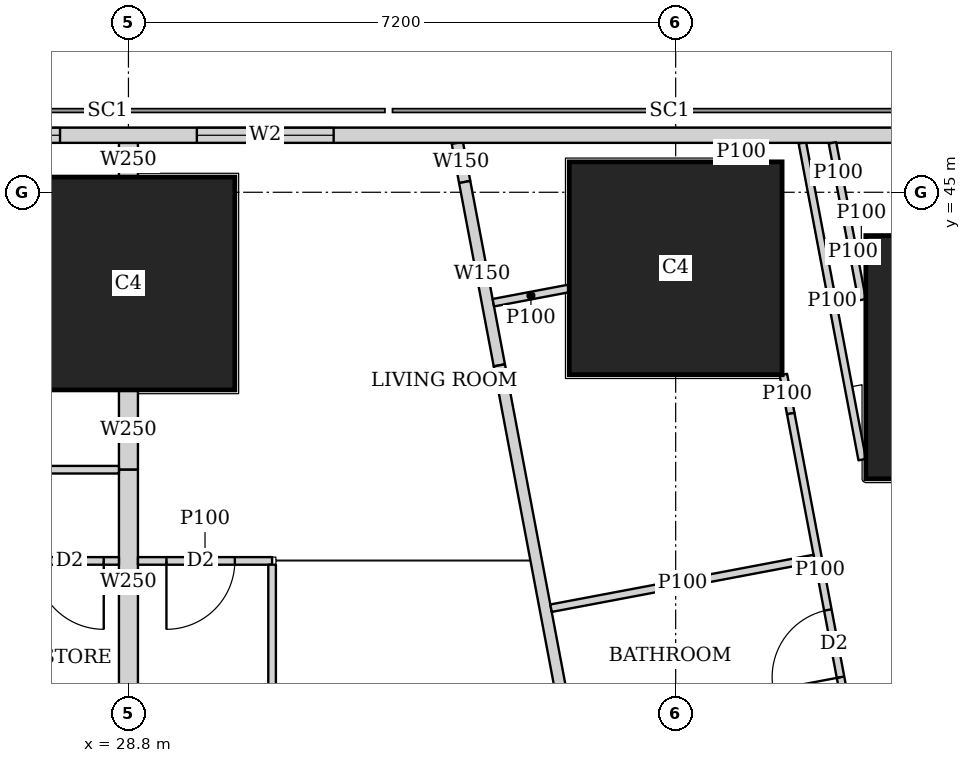
"""IFC4 building model, lengths in metres.
Left out: names, types, materials, properties, quantities, classifications, styles, units other than length and angle.
Written with IfcOpenShell. Run it as: python <this file> out.ifc"""

import sys

from ifc_helpers import new_model, si_unit, direction, frame, frame_2d, origin, origin_2d, place, context, subcontext, project, spatial, rectangle, extrude, element, fill, save


model = new_model("IFC4")
c1 = context("Model", 3, precision=1e-05, world=origin(), true_north=direction((0.0, 1.0)))
c2 = subcontext(c1, "Body", "Model", "MODEL_VIEW")
j1 = project(units=[si_unit("LENGTHUNIT", "METRE"), si_unit("PLANEANGLEUNIT", "RADIAN")], contexts=[c1])
p1 = place(None, origin())
s1 = spatial("IfcSite", under=j1, at=p1, CompositionType="ELEMENT")
p2 = place(p1, origin())
s2 = spatial("IfcBuilding", under=s1, at=p2, CompositionType="ELEMENT")
p3 = place(p2, frame((0.0, 0.0, 42.5)))
s3 = spatial("IfcBuildingStorey", under=s2, at=p3, CompositionType="ELEMENT", Elevation=42.5)
p4 = place(p3, frame((40.102, 42.83, 0.0), z_axis=(0.0, 0.0, 1.0), x_axis=(1.0, 0.0, 0.0)))
e1 = element("IfcColumn", 1, at=p4, inside=s3, PredefinedType="COLUMN", context=c2, shape_type="SweptSolid", body=[
    extrude(rectangle(XDim=3.2, YDim=3.2, at=origin_2d()), origin(), (0.0, 0.0, 1.0), 3.75),
])
for number, where, z_axis, x_axis in (
    (2, (28.8, 43.8, 0.0), (0.0, 0.0, 1.0), (1.0, 0.0, 0.0)),
    (3, (36.0, 44.0, 0.0), (0.0, 0.0, 1.0), (1.0, 0.0, 0.0)),
):
    element("IfcColumn", number, at=place(p3, frame(where, z_axis=z_axis, x_axis=x_axis)), inside=s3, PredefinedType="COLUMN", context=c2, shape_type="SweptSolid", body=[
        extrude(rectangle(XDim=2.8, YDim=2.8, at=origin_2d()), origin(), (0.0, 0.0, 1.0), 3.75),
    ])
p5 = place(p3, frame((40.106, 45.75, 0.0), z_axis=(0.0, 0.0, 1.0), x_axis=(-1.0, 0.0, 0.0)))
e4 = element("IfcWall", 4, at=p5, inside=s3, PredefinedType="SOLIDWALL", context=c2, shape_type="SweptSolid", body=[
    extrude(rectangle(XDim=37.943, YDim=0.2, at=frame_2d((18.971, 0.0))), origin(), (0.0, 0.0, 1.0), 3.5),
])
p6 = place(p5, frame((8.606, 0.0, 0.9)))
e5 = element("IfcOpeningElement", 5, at=p6, cuts=e4, PredefinedType="OPENING", context=c2, shape_type="SweptSolid", body=[
    extrude(rectangle(XDim=1.8, YDim=1.5, at=frame_2d((0.9, 0.75))), frame((0.0, 0.11, 0.0), z_axis=(0.0, -1.0, 0.0), x_axis=(1.0, 0.0, 0.0)), (0.0, 0.0, 1.0), 0.22),
])
p7 = place(p5, frame((12.206, 0.0, 0.9)))
e6 = element("IfcOpeningElement", 6, at=p7, cuts=e4, PredefinedType="OPENING", context=c2, shape_type="SweptSolid", body=[
    extrude(rectangle(XDim=1.8, YDim=1.5, at=frame_2d((0.9, 0.75))), frame((0.0, 0.11, 0.0), z_axis=(0.0, -1.0, 0.0), x_axis=(1.0, 0.0, 0.0)), (0.0, 0.0, 1.0), 0.22),
])
p8 = place(p5, frame((15.806, 0.0, 0.9)))
e7 = element("IfcOpeningElement", 7, at=p8, cuts=e4, PredefinedType="OPENING", context=c2, shape_type="SweptSolid", body=[
    extrude(rectangle(XDim=1.8, YDim=1.5, at=frame_2d((0.9, 0.75))), frame((0.0, 0.11, 0.0), z_axis=(0.0, -1.0, 0.0), x_axis=(1.0, 0.0, 0.0)), (0.0, 0.0, 1.0), 0.22),
])
p9 = place(p5, frame((19.406, 0.0, 0.9)))
e8 = element("IfcOpeningElement", 8, at=p9, cuts=e4, PredefinedType="OPENING", context=c2, shape_type="SweptSolid", body=[
    extrude(rectangle(XDim=1.8, YDim=1.5, at=frame_2d((0.9, 0.75))), frame((0.0, 0.11, 0.0), z_axis=(0.0, -1.0, 0.0), x_axis=(1.0, 0.0, 0.0)), (0.0, 0.0, 1.0), 0.22),
])
p10 = place(p5, frame((23.006, 0.0, 0.9)))
e9 = element("IfcOpeningElement", 9, at=p10, cuts=e4, PredefinedType="OPENING", context=c2, shape_type="SweptSolid", body=[
    extrude(rectangle(XDim=1.8, YDim=1.5, at=frame_2d((0.9, 0.75))), frame((0.0, 0.11, 0.0), z_axis=(0.0, -1.0, 0.0), x_axis=(1.0, 0.0, 0.0)), (0.0, 0.0, 1.0), 0.22),
])
p11 = place(p5, frame((26.606, 0.0, 0.9)))
e10 = element("IfcOpeningElement", 10, at=p11, cuts=e4, PredefinedType="OPENING", context=c2, shape_type="SweptSolid", body=[
    extrude(rectangle(XDim=1.8, YDim=1.5, at=frame_2d((0.9, 0.75))), frame((0.0, 0.11, 0.0), z_axis=(0.0, -1.0, 0.0), x_axis=(1.0, 0.0, 0.0)), (0.0, 0.0, 1.0), 0.22),
])
p12 = place(p3, frame((33.127, 45.65, 0.0), z_axis=(0.0, 0.0, 1.0), x_axis=(0.185441815104, -0.982655246366, 0.0)))
e11 = element("IfcWall", 11, at=p12, inside=s3, PredefinedType="SOLIDWALL", context=c2, shape_type="SweptSolid", body=[
    extrude(rectangle(XDim=0.524, YDim=0.15, at=frame_2d((0.262, 0.0))), origin(), (0.0, 0.0, 1.0), 3.5),
])
p13 = place(p3, frame((33.224, 45.135, 0.0), z_axis=(0.0, 0.0, 1.0), x_axis=(0.185681462868, -0.982609990967, 0.0)))
e12 = element("IfcWall", 12, at=p13, inside=s3, PredefinedType="SOLIDWALL", context=c2, shape_type="SweptSolid", body=[
    extrude(rectangle(XDim=2.455, YDim=0.15, at=frame_2d((1.228, 0.0))), origin(), (0.0, 0.0, 1.0), 2.05),
])
p14 = place(p3, frame((33.68, 42.723, 0.0), z_axis=(0.0, 0.0, 1.0), x_axis=(0.185624129307, -0.98262082342, 0.0)))
e13 = element("IfcWall", 13, at=p14, inside=s3, PredefinedType="SOLIDWALL", context=c2, shape_type="SweptSolid", body=[
    extrude(rectangle(XDim=41.051, YDim=0.15, at=frame_2d((20.526, 0.0))), origin(), (0.0, 0.0, 1.0), 2.5),
])
p15 = place(p14, frame((7.73, 0.0, 0.0)))
e14 = element("IfcOpeningElement", 14, at=p15, cuts=e13, PredefinedType="OPENING", context=c2, shape_type="SweptSolid", body=[
    extrude(rectangle(XDim=1.0, YDim=2.1, at=frame_2d((0.5, 1.05))), frame((0.0, 0.085, 0.0), z_axis=(0.0, -1.0, 0.0), x_axis=(1.0, 0.0, 0.0)), (0.0, 0.0, 1.0), 0.17),
])
p16 = place(p14, frame((12.307, 0.0, 0.0)))
e15 = element("IfcOpeningElement", 15, at=p16, cuts=e13, PredefinedType="OPENING", context=c2, shape_type="SweptSolid", body=[
    extrude(rectangle(XDim=1.0, YDim=2.1, at=frame_2d((0.5, 1.05))), frame((0.0, 0.085, 0.0), z_axis=(0.0, -1.0, 0.0), x_axis=(1.0, 0.0, 0.0)), (0.0, 0.0, 1.0), 0.17),
])
p17 = place(p14, frame((19.938, 0.0, 0.0)))
e16 = element("IfcOpeningElement", 16, at=p17, cuts=e13, PredefinedType="OPENING", context=c2, shape_type="SweptSolid", body=[
    extrude(rectangle(XDim=1.0, YDim=2.1, at=frame_2d((0.5, 1.05))), frame((0.0, 0.085, 0.0), z_axis=(0.0, -1.0, 0.0), x_axis=(1.0, 0.0, 0.0)), (0.0, 0.0, 1.0), 0.17),
])
p18 = place(p14, frame((32.193, 0.0, 0.0)))
e17 = element("IfcOpeningElement", 17, at=p18, cuts=e13, PredefinedType="OPENING", context=c2, shape_type="SweptSolid", body=[
    extrude(rectangle(XDim=1.0, YDim=2.1, at=frame_2d((0.5, 1.05))), frame((0.0, 0.085, 0.0), z_axis=(0.0, -1.0, 0.0), x_axis=(1.0, 0.0, 0.0)), (0.0, 0.0, 1.0), 0.17),
])
p19 = place(p3, frame((38.454, 41.483, 0.0), z_axis=(0.0, 0.0, 1.0), x_axis=(-0.185609245326, 0.982623634994, 0.0)))
e18 = element("IfcWall", 18, at=p19, inside=s3, PredefinedType="PARTITIONING", context=c2, shape_type="SweptSolid", body=[
    extrude(rectangle(XDim=4.241, YDim=0.1, at=frame_2d((2.12, 0.0))), origin(), (0.0, 0.0, 1.0), 2.05),
])
p20 = place(p3, frame((38.063, 45.65, 0.0), z_axis=(0.0, 0.0, 1.0), x_axis=(0.186109918919, -0.982528929895, 0.0)))
e19 = element("IfcWall", 19, at=p20, inside=s3, PredefinedType="PARTITIONING", context=c2, shape_type="SweptSolid", body=[
    extrude(rectangle(XDim=0.817, YDim=0.1, at=frame_2d((0.409, 0.0))), origin(), (0.0, 0.0, 1.0), 3.5),
])
p21 = place(p3, frame((38.215, 44.847, 0.0), z_axis=(0.0, 0.0, 1.0), x_axis=(0.185310800156, -0.982679961811, 0.0)))
e20 = element("IfcWall", 20, at=p21, inside=s3, PredefinedType="PARTITIONING", context=c2, shape_type="SweptSolid", body=[
    extrude(rectangle(XDim=1.283, YDim=0.1, at=frame_2d((0.642, 0.0))), origin(), (0.0, 0.0, 1.0), 2.05),
])
p22 = place(p3, frame((36.841, 45.65, 0.0), z_axis=(0.0, 0.0, 1.0), x_axis=(0.183986661451, -0.982928740249, 0.0)))
e21 = element("IfcWall", 21, at=p22, inside=s3, PredefinedType="PARTITIONING", context=c2, shape_type="SweptSolid", body=[
    extrude(rectangle(XDim=0.244, YDim=0.1, at=frame_2d((0.122, 0.0))), origin(), (0.0, 0.0, 1.0), 3.5),
])
p23 = place(p3, frame((37.417, 42.602, 0.0), z_axis=(0.0, 0.0, 1.0), x_axis=(0.185672001976, -0.982611778721, 0.0)))
e22 = element("IfcWall", 22, at=p23, inside=s3, PredefinedType="PARTITIONING", context=c2, shape_type="SweptSolid", body=[
    extrude(rectangle(XDim=0.522, YDim=0.1, at=frame_2d((0.261, 0.0))), origin(), (0.0, 0.0, 1.0), 2.05),
])
p24 = place(p3, frame((37.514, 42.089, 0.0), z_axis=(0.0, 0.0, 1.0), x_axis=(0.185540945282, -0.982636533833, 0.0)))
e23 = element("IfcWall", 23, at=p24, inside=s3, PredefinedType="PARTITIONING", context=c2, shape_type="SweptSolid", body=[
    extrude(rectangle(XDim=4.178, YDim=0.1, at=frame_2d((2.089, 0.0))), origin(), (0.0, 0.0, 1.0), 3.5),
])
p25 = place(p24, frame((2.63, 0.0, 0.0)))
e24 = element("IfcOpeningElement", 24, at=p25, cuts=e23, PredefinedType="OPENING", context=c2, shape_type="SweptSolid", body=[
    extrude(rectangle(XDim=0.9, YDim=2.1, at=frame_2d((0.45, 1.05))), frame((0.0, 0.06, 0.0), z_axis=(0.0, -1.0, 0.0), x_axis=(1.0, 0.0, 0.0)), (0.0, 0.0, 1.0), 0.12),
])
p26 = place(p3, frame((38.492, 44.193, 0.0), z_axis=(0.0, 0.0, 1.0), x_axis=(-0.981954528773, -0.189117168504, 0.0)))
e25 = element("IfcWall", 25, at=p26, inside=s3, PredefinedType="PARTITIONING", context=c2, shape_type="SweptSolid", body=[
    extrude(rectangle(XDim=0.101, YDim=0.1, at=frame_2d((0.05, 0.0))), origin(), (0.0, 0.0, 1.0), 2.05),
])
p27 = place(p3, frame((34.59, 43.734, 0.0), z_axis=(0.0, 0.0, 1.0), x_axis=(-0.982632457012, -0.185562535081, 0.0)))
e26 = element("IfcWall", 26, at=p27, inside=s3, PredefinedType="PARTITIONING", context=c2, shape_type="SweptSolid", body=[
    extrude(rectangle(XDim=1.007, YDim=0.1, at=frame_2d((0.503, 0.0))), origin(), (0.0, 0.0, 1.0), 2.05),
])
p28 = place(p3, frame((37.823, 40.182, 0.0), z_axis=(0.0, 0.0, 1.0), x_axis=(-0.98263926043, -0.185526504472, 0.0)))
e27 = element("IfcWall", 27, at=p28, inside=s3, PredefinedType="PARTITIONING", context=c2, shape_type="SweptSolid", body=[
    extrude(rectangle(XDim=3.524, YDim=0.1, at=frame_2d((1.762, 0.0))), origin(), (0.0, 0.0, 1.0), 3.5),
])
p29 = place(p3, frame((25.2, 41.35, 0.0), z_axis=(0.0, 0.0, 1.0), x_axis=(1.0, 0.0, 0.0)))
e28 = element("IfcWall", 28, at=p29, inside=s3, PredefinedType="PARTITIONING", context=c2, shape_type="SweptSolid", body=[
    extrude(rectangle(XDim=3.475, YDim=0.1, at=frame_2d((1.738, 0.0))), origin(), (0.0, 0.0, 1.0), 3.5),
])
p30 = place(p29, frame((0.2, 0.0, 0.0)))
e29 = element("IfcOpeningElement", 29, at=p30, cuts=e28, PredefinedType="OPENING", context=c2, shape_type="SweptSolid", body=[
    extrude(rectangle(XDim=0.9, YDim=2.1, at=frame_2d((0.45, 1.05))), frame((0.0, 0.06, 0.0), z_axis=(0.0, -1.0, 0.0), x_axis=(1.0, 0.0, 0.0)), (0.0, 0.0, 1.0), 0.12),
])
p31 = place(p3, frame((25.2, 40.15, 0.0), z_axis=(0.0, 0.0, 1.0), x_axis=(1.0, 0.0, 0.0)))
e30 = element("IfcWall", 30, at=p31, inside=s3, PredefinedType="PARTITIONING", context=c2, shape_type="SweptSolid", body=[
    extrude(rectangle(XDim=3.475, YDim=0.1, at=frame_2d((1.738, 0.0))), origin(), (0.0, 0.0, 1.0), 3.5),
])
p32 = place(p31, frame((0.575, 0.0, 0.0)))
e31 = element("IfcOpeningElement", 31, at=p32, cuts=e30, PredefinedType="OPENING", context=c2, shape_type="SweptSolid", body=[
    extrude(rectangle(XDim=0.9, YDim=2.1, at=frame_2d((0.45, 1.05))), frame((0.0, 0.06, 0.0), z_axis=(0.0, -1.0, 0.0), x_axis=(1.0, 0.0, 0.0)), (0.0, 0.0, 1.0), 0.12),
])
p33 = place(p31, frame((2.375, 0.0, 0.0)))
e32 = element("IfcOpeningElement", 32, at=p33, cuts=e30, PredefinedType="OPENING", context=c2, shape_type="SweptSolid", body=[
    extrude(rectangle(XDim=0.9, YDim=2.1, at=frame_2d((0.45, 1.05))), frame((0.0, 0.06, 0.0), z_axis=(0.0, -1.0, 0.0), x_axis=(1.0, 0.0, 0.0)), (0.0, 0.0, 1.0), 0.12),
])
p34 = place(p3, frame((28.925, 40.15, 0.0), z_axis=(0.0, 0.0, 1.0), x_axis=(1.0, 0.0, 0.0)))
e33 = element("IfcWall", 33, at=p34, inside=s3, PredefinedType="PARTITIONING", context=c2, shape_type="SweptSolid", body=[
    extrude(rectangle(XDim=1.765, YDim=0.1, at=frame_2d((0.882, 0.0))), origin(), (0.0, 0.0, 1.0), 3.5),
])
p35 = place(p34, frame((0.375, 0.0, 0.0)))
e34 = element("IfcOpeningElement", 34, at=p35, cuts=e33, PredefinedType="OPENING", context=c2, shape_type="SweptSolid", body=[
    extrude(rectangle(XDim=0.9, YDim=2.1, at=frame_2d((0.45, 1.05))), frame((0.0, 0.06, 0.0), z_axis=(0.0, -1.0, 0.0), x_axis=(1.0, 0.0, 0.0)), (0.0, 0.0, 1.0), 0.12),
])
p36 = place(p3, frame((30.69, 36.575, 0.0), z_axis=(0.0, 0.0, 1.0), x_axis=(0.0, 1.0, 0.0)))
e35 = element("IfcWall", 35, at=p36, inside=s3, PredefinedType="PARTITIONING", context=c2, shape_type="SweptSolid", body=[
    extrude(rectangle(XDim=3.525, YDim=0.1, at=frame_2d((1.763, 0.0))), origin(), (0.0, 0.0, 1.0), 3.5),
])
p37 = place(p3, frame((28.8, 41.35, 0.0), z_axis=(0.0, 0.0, 1.0), x_axis=(0.0, 1.0, 0.0)))
e36 = element("IfcWall", 36, at=p37, inside=s3, PredefinedType="SOLIDWALL", context=c2, shape_type="SweptSolid", body=[
    extrude(rectangle(XDim=1.049, YDim=0.25, at=frame_2d((0.524, 0.0))), origin(), (0.0, 0.0, 1.0), 3.5),
])
p38 = place(p3, frame((28.8, 45.201, 0.0), z_axis=(0.0, 0.0, 1.0), x_axis=(0.0, 1.0, 0.0)))
e37 = element("IfcWall", 37, at=p38, inside=s3, PredefinedType="SOLIDWALL", context=c2, shape_type="SweptSolid", body=[
    extrude(rectangle(XDim=0.449, YDim=0.25, at=frame_2d((0.225, 0.0))), origin(), (0.0, 0.0, 1.0), 3.5),
])
p39 = place(p3, frame((28.8, 38.401, 0.0), z_axis=(0.0, 0.0, 1.0), x_axis=(0.0, 1.0, 0.0)))
e38 = element("IfcWall", 38, at=p39, inside=s3, PredefinedType="SOLIDWALL", context=c2, shape_type="SweptSolid", body=[
    extrude(rectangle(XDim=2.949, YDim=0.25, at=frame_2d((1.475, 0.0))), origin(), (0.0, 0.0, 1.0), 3.5),
])
p40 = place(p6, origin())
e39 = element("IfcWindow", 39, at=p40, inside=s3, PartitioningType="SINGLE_PANEL", PredefinedType="WINDOW", context=c2, shape_type="SweptSolid", body=[
    extrude(rectangle(XDim=1.8, YDim=1.5, at=frame_2d((0.9, 0.75))), frame((0.0, 0.03, 0.0), z_axis=(0.0, -1.0, 0.0), x_axis=(1.0, 0.0, 0.0)), (0.0, 0.0, 1.0), 0.06),
])
fill(e5, e39)
p41 = place(p7, origin())
e40 = element("IfcWindow", 40, at=p41, inside=s3, PartitioningType="SINGLE_PANEL", PredefinedType="WINDOW", context=c2, shape_type="SweptSolid", body=[
    extrude(rectangle(XDim=1.8, YDim=1.5, at=frame_2d((0.9, 0.75))), frame((0.0, 0.03, 0.0), z_axis=(0.0, -1.0, 0.0), x_axis=(1.0, 0.0, 0.0)), (0.0, 0.0, 1.0), 0.06),
])
fill(e6, e40)
p42 = place(p25, origin())
e41 = element("IfcDoor", 41, at=p42, inside=s3, OperationType="SINGLE_SWING_LEFT", PredefinedType="DOOR", context=c2, shape_type="SweptSolid", body=[
    extrude(rectangle(XDim=0.9, YDim=2.1, at=frame_2d((0.45, 1.05))), frame((0.0, 0.025, 0.0), z_axis=(0.0, -1.0, 0.0), x_axis=(1.0, 0.0, 0.0)), (0.0, 0.0, 1.0), 0.05),
])
fill(e24, e41)
p43 = place(p33, origin())
e42 = element("IfcDoor", 42, at=p43, inside=s3, OperationType="SINGLE_SWING_LEFT", PredefinedType="DOOR", context=c2, shape_type="SweptSolid", body=[
    extrude(rectangle(XDim=0.9, YDim=2.1, at=frame_2d((0.45, 1.05))), frame((0.0, 0.025, 0.0), z_axis=(0.0, -1.0, 0.0), x_axis=(1.0, 0.0, 0.0)), (0.0, 0.0, 1.0), 0.05),
])
fill(e32, e42)
p44 = place(p35, origin())
e43 = element("IfcDoor", 43, at=p44, inside=s3, OperationType="SINGLE_SWING_RIGHT", PredefinedType="DOOR", context=c2, shape_type="SweptSolid", body=[
    extrude(rectangle(XDim=0.9, YDim=2.1, at=frame_2d((0.45, 1.05))), frame((0.0, 0.025, 0.0), z_axis=(0.0, -1.0, 0.0), x_axis=(1.0, 0.0, 0.0)), (0.0, 0.0, 1.0), 0.05),
])
fill(e34, e43)
save(model, sys.argv[1])
